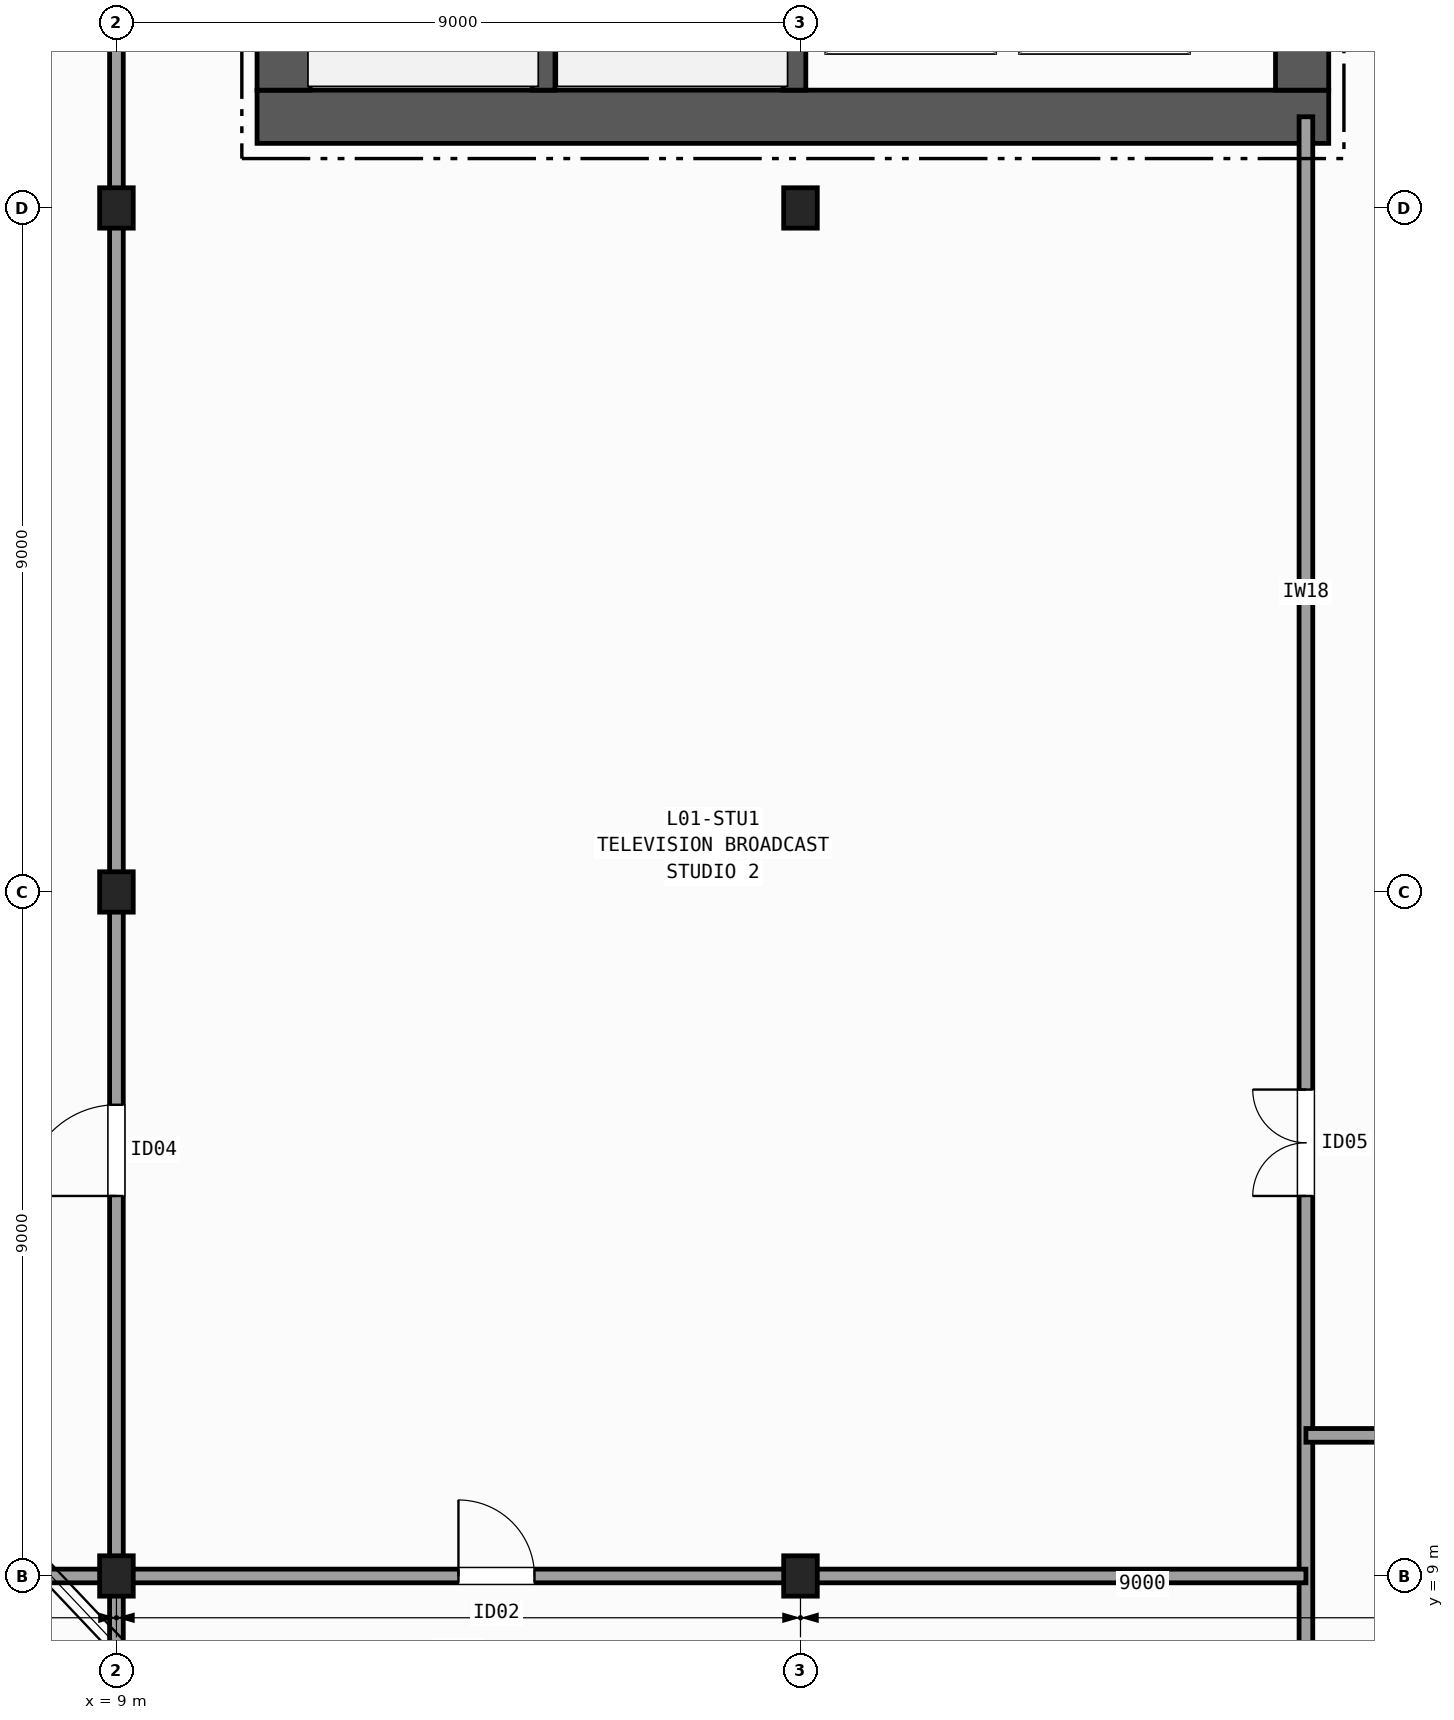
"""IFC4 building model, lengths in metres.
Left out: names, types, materials, properties, quantities, classifications, styles, units other than length and angle.
Written with IfcOpenShell. Run it as: python <this file> out.ifc"""

import sys

from ifc_helpers import new_model, si_unit, direction, frame, frame_2d, origin, origin_2d, place, context, subcontext, project, spatial, rectangle, i_section, extrude, element, fill, save


model = new_model("IFC4")
c1 = context("Model", 3, precision=1e-05, world=origin(), true_north=direction((0.0, 1.0)))
c2 = subcontext(c1, "Body", "Model", "MODEL_VIEW")
j1 = project(units=[si_unit("LENGTHUNIT", "METRE"), si_unit("PLANEANGLEUNIT", "RADIAN")], contexts=[c1])
p1 = place(None, origin())
s1 = spatial("IfcSite", under=j1, at=p1, CompositionType="ELEMENT")
p2 = place(p1, origin())
s2 = spatial("IfcBuilding", under=s1, at=p2, CompositionType="ELEMENT")
p3 = place(p2, frame((0.0, 0.0, 5.8)))
s3 = spatial("IfcBuildingStorey", under=s2, at=p3, CompositionType="ELEMENT", Elevation=5.8)
for number, where, z_axis, x_axis in (
    (1, (9.0, 9.0, 0.0), (0.0, 0.0, 1.0), (1.0, 0.0, 0.0)),
    (2, (9.0, 18.0, 0.0), (0.0, 0.0, 1.0), (1.0, 0.0, 0.0)),
    (3, (9.0, 27.0, 0.0), (0.0, 0.0, 1.0), (1.0, 0.0, 0.0)),
    (4, (18.0, 9.0, 0.0), (0.0, 0.0, 1.0), (1.0, 0.0, 0.0)),
    (5, (18.0, 27.0, 0.0), (0.0, 0.0, 1.0), (1.0, 0.0, 0.0)),
):
    element("IfcColumn", number, at=place(p3, frame(where, z_axis=z_axis, x_axis=x_axis)), inside=s3, PredefinedType="COLUMN", context=c2, shape_type="SweptSolid", body=[
        extrude(i_section(OverallWidth=0.442, OverallDepth=0.531, WebThickness=0.066, FlangeThickness=0.106, FilletRadius=0.015, at=origin_2d()), origin(), (0.0, 0.0, 1.0), 5.2),
    ])
p4 = place(p3, frame((10.85, 28.2, 0.0), z_axis=(0.0, 0.0, 1.0), x_axis=(1.0, 0.0, 0.0)))
e6 = element("IfcWall", 6, at=p4, inside=s3, PredefinedType="SHEAR", context=c2, shape_type="SweptSolid", body=[
    extrude(rectangle(XDim=14.1, YDim=0.7, at=frame_2d((7.05, 0.0))), origin(), (0.0, 0.0, 1.0), 4.88),
])
p5 = place(p3, frame((11.2, 42.05, 0.0), z_axis=(0.0, 0.0, 1.0), x_axis=(0.0, -1.0, 0.0)))
e7 = element("IfcWall", 7, at=p5, inside=s3, PredefinedType="SHEAR", context=c2, shape_type="SweptSolid", body=[
    extrude(rectangle(XDim=13.5, YDim=0.7, at=frame_2d((6.75, 0.0))), origin(), (0.0, 0.0, 1.0), 4.88),
])
p6 = place(p3, frame((24.6, 28.55, 0.0), z_axis=(0.0, 0.0, 1.0), x_axis=(0.0, 1.0, 0.0)))
e8 = element("IfcWall", 8, at=p6, inside=s3, PredefinedType="SHEAR", context=c2, shape_type="SweptSolid", body=[
    extrude(rectangle(XDim=13.5, YDim=0.7, at=frame_2d((6.75, 0.0))), origin(), (0.0, 0.0, 1.0), 4.88),
])
p7 = place(p6, frame((3.25, 0.0, 0.0)))
e9 = element("IfcOpeningElement", 9, at=p7, cuts=e8, PredefinedType="OPENING", context=c2, shape_type="SweptSolid", body=[
    extrude(rectangle(XDim=1.5, YDim=2.2, at=frame_2d((0.75, 1.1))), frame((0.0, 0.36, 0.0), z_axis=(0.0, -1.0, 0.0), x_axis=(1.0, 0.0, 0.0)), (0.0, 0.0, 1.0), 0.72),
])
p8 = place(p6, frame((9.85, 0.0, 0.0)))
e10 = element("IfcOpeningElement", 10, at=p8, cuts=e8, PredefinedType="OPENING", context=c2, shape_type="SweptSolid", body=[
    extrude(rectangle(XDim=0.9, YDim=2.1, at=frame_2d((0.45, 1.05))), frame((0.0, 0.36, 0.0), z_axis=(0.0, -1.0, 0.0), x_axis=(1.0, 0.0, 0.0)), (0.0, 0.0, 1.0), 0.72),
])
p9 = place(p3, frame((14.62, 28.55, 0.0), z_axis=(0.0, 0.0, 1.0), x_axis=(0.0, 1.0, 0.0)))
e11 = element("IfcWall", 11, at=p9, inside=s3, PredefinedType="SHEAR", context=c2, shape_type="SweptSolid", body=[
    extrude(rectangle(XDim=8.9, YDim=0.3, at=frame_2d((4.45, 0.0))), origin(), (0.0, 0.0, 1.0), 4.88),
])
p10 = place(p3, frame((17.92, 42.05, 0.0), z_axis=(0.0, 0.0, 1.0), x_axis=(0.0, -1.0, 0.0)))
e12 = element("IfcWall", 12, at=p10, inside=s3, PredefinedType="SHEAR", context=c2, shape_type="SweptSolid", body=[
    extrude(rectangle(XDim=13.5, YDim=0.3, at=frame_2d((6.75, 0.0))), origin(), (0.0, 0.0, 1.0), 4.88),
])
p11 = place(p10, frame((1.875, 0.0, 0.0)))
e13 = element("IfcOpeningElement", 13, at=p11, cuts=e12, PredefinedType="OPENING", context=c2, shape_type="SweptSolid", body=[
    extrude(rectangle(XDim=1.15, YDim=2.15, at=frame_2d((0.575, 1.075))), frame((0.0, 0.16, 0.0), z_axis=(0.0, -1.0, 0.0), x_axis=(1.0, 0.0, 0.0)), (0.0, 0.0, 1.0), 0.32),
])
p12 = place(p3, frame((24.65, 1.8, 0.0), z_axis=(0.0, 0.0, 1.0), x_axis=(0.0, 1.0, 0.0)))
e14 = element("IfcWall", 14, at=p12, inside=s3, PredefinedType="PARTITIONING", context=c2, shape_type="SweptSolid", body=[
    extrude(rectangle(XDim=26.4, YDim=0.18, at=frame_2d((13.2, 0.0))), origin(), (0.0, 0.0, 1.0), 3.912),
])
p13 = place(p12, frame((12.2, 0.0, 0.0)))
e15 = element("IfcOpeningElement", 15, at=p13, cuts=e14, PredefinedType="OPENING", context=c2, shape_type="SweptSolid", body=[
    extrude(rectangle(XDim=1.4, YDim=2.15, at=frame_2d((0.7, 1.075))), frame((0.0, 0.1, 0.0), z_axis=(0.0, -1.0, 0.0), x_axis=(1.0, 0.0, 0.0)), (0.0, 0.0, 1.0), 0.2),
])
p14 = place(p3, frame((24.65, 10.85, 0.0), z_axis=(0.0, 0.0, 1.0), x_axis=(1.0, 0.0, 0.0)))
e16 = element("IfcWall", 16, at=p14, inside=s3, PredefinedType="PARTITIONING", context=c2, shape_type="SweptSolid", body=[
    extrude(rectangle(XDim=38.35, YDim=0.18, at=frame_2d((19.175, 0.0))), origin(), (0.0, 0.0, 1.0), 4.005),
])
p15 = place(p14, frame((2.0, 0.0, 0.0)))
e17 = element("IfcOpeningElement", 17, at=p15, cuts=e16, PredefinedType="OPENING", context=c2, shape_type="SweptSolid", body=[
    extrude(rectangle(XDim=1.2, YDim=2.15, at=frame_2d((0.6, 1.075))), frame((0.0, 0.1, 0.0), z_axis=(0.0, -1.0, 0.0), x_axis=(1.0, 0.0, 0.0)), (0.0, 0.0, 1.0), 0.2),
])
p16 = place(p3, frame((9.0, 1.8, 0.0), z_axis=(0.0, 0.0, 1.0), x_axis=(0.0, 1.0, 0.0)))
e18 = element("IfcWall", 18, at=p16, inside=s3, PredefinedType="PARTITIONING", context=c2, shape_type="SweptSolid", body=[
    extrude(rectangle(XDim=52.2, YDim=0.18, at=frame_2d((26.1, 0.0))), origin(), (0.0, 0.0, 1.0), 3.912),
])
p17 = place(p16, frame((12.2, 0.0, 0.0)))
e19 = element("IfcOpeningElement", 19, at=p17, cuts=e18, PredefinedType="OPENING", context=c2, shape_type="SweptSolid", body=[
    extrude(rectangle(XDim=1.2, YDim=2.15, at=frame_2d((0.6, 1.075))), frame((0.0, 0.1, 0.0), z_axis=(0.0, -1.0, 0.0), x_axis=(1.0, 0.0, 0.0)), (0.0, 0.0, 1.0), 0.2),
])
p18 = place(p3, frame((1.8, 9.0, 0.0), z_axis=(0.0, 0.0, 1.0), x_axis=(1.0, 0.0, 0.0)))
e20 = element("IfcWall", 20, at=p18, inside=s3, PredefinedType="PARTITIONING", context=c2, shape_type="SweptSolid", body=[
    extrude(rectangle(XDim=22.85, YDim=0.18, at=frame_2d((11.425, 0.0))), origin(), (0.0, 0.0, 1.0), 3.933),
])
p19 = place(p18, frame((11.7, 0.0, 0.0)))
e21 = element("IfcOpeningElement", 21, at=p19, cuts=e20, PredefinedType="OPENING", context=c2, shape_type="SweptSolid", body=[
    extrude(rectangle(XDim=1.0, YDim=2.1, at=frame_2d((0.5, 1.05))), frame((0.0, 0.1, 0.0), z_axis=(0.0, -1.0, 0.0), x_axis=(1.0, 0.0, 0.0)), (0.0, 0.0, 1.0), 0.2),
])
p20 = place(p13, origin())
e22 = element("IfcDoor", 22, at=p20, inside=s3, OperationType="DOUBLE_DOOR_SINGLE_SWING", PredefinedType="DOOR", context=c2, shape_type="SweptSolid", body=[
    extrude(rectangle(XDim=1.4, YDim=2.15, at=frame_2d((0.7, 1.075))), frame((0.0, 0.025, 0.0), z_axis=(0.0, -1.0, 0.0), x_axis=(1.0, 0.0, 0.0)), (0.0, 0.0, 1.0), 0.05),
])
fill(e15, e22)
p21 = place(p17, origin())
e23 = element("IfcDoor", 23, at=p21, inside=s3, OperationType="SINGLE_SWING_LEFT", PredefinedType="DOOR", context=c2, shape_type="SweptSolid", body=[
    extrude(rectangle(XDim=1.2, YDim=2.15, at=frame_2d((0.6, 1.075))), frame((0.0, 0.025, 0.0), z_axis=(0.0, -1.0, 0.0), x_axis=(1.0, 0.0, 0.0)), (0.0, 0.0, 1.0), 0.05),
])
fill(e19, e23)
p22 = place(p19, origin())
e24 = element("IfcDoor", 24, at=p22, inside=s3, OperationType="SINGLE_SWING_LEFT", PredefinedType="DOOR", context=c2, shape_type="SweptSolid", body=[
    extrude(rectangle(XDim=1.0, YDim=2.1, at=frame_2d((0.5, 1.05))), frame((0.0, 0.025, 0.0), z_axis=(0.0, -1.0, 0.0), x_axis=(1.0, 0.0, 0.0)), (0.0, 0.0, 1.0), 0.05),
])
fill(e21, e24)
save(model, sys.argv[1])
